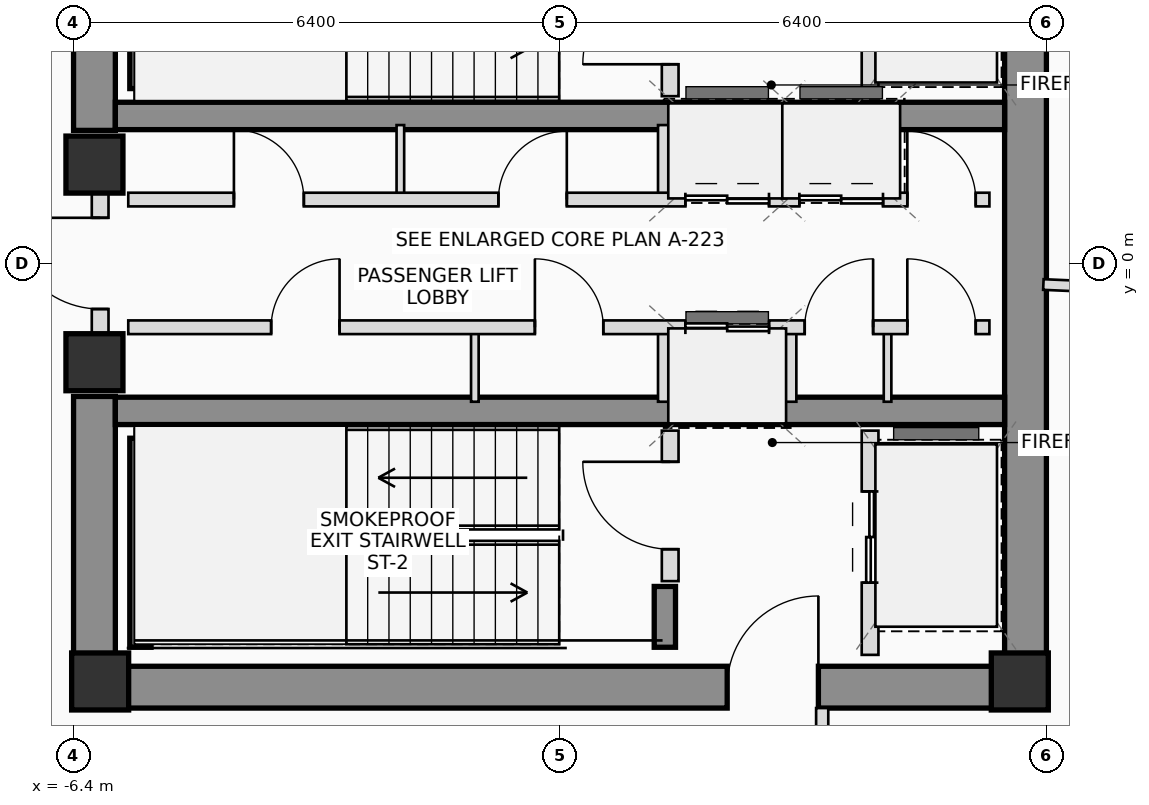
"""IFC4 building model, lengths in metres.
Left out: names, types, materials, properties, quantities, classifications, styles, units other than length and angle.
Written with IfcOpenShell. Run it as: python <this file> out.ifc"""

import sys

from ifc_helpers import new_model, si_unit, direction, frame, frame_2d, origin, origin_2d, place, context, subcontext, project, spatial, rectangle, extrude, source, transform, mapped, element, fill, save


model = new_model("IFC4")
c1 = context("Model", 3, precision=1e-05, world=origin(), true_north=direction((0.0, 1.0)))
c2 = subcontext(c1, "Body", "Model", "MODEL_VIEW")
j1 = project(units=[si_unit("LENGTHUNIT", "METRE"), si_unit("PLANEANGLEUNIT", "RADIAN")], contexts=[c1])
p1 = place(None, origin())
s1 = spatial("IfcSite", under=j1, at=p1, CompositionType="ELEMENT")
p2 = place(p1, origin())
s2 = spatial("IfcBuilding", under=s1, at=p2, CompositionType="ELEMENT")
p3 = place(p2, frame((0.0, 0.0, 245.65)))
s3 = spatial("IfcBuildingStorey", under=s2, at=p3, CompositionType="ELEMENT", Elevation=245.65)
m1 = source(origin(), c2, "Body", "SweptSolid", [
    extrude(rectangle(XDim=0.75, YDim=0.75, at=origin_2d()), origin(), (0.0, 0.0, 1.0), 3.4),
])
for number, where, z_axis, x_axis in (
    (1, (-6.05, -5.5, 0.0), (0.0, 0.0, 1.0), (1.0, 0.0, 0.0)),
    (2, (6.05, -5.5, 0.0), (0.0, 0.0, 1.0), (1.0, 0.0, 0.0)),
):
    element("IfcColumn", number, at=place(p3, frame(where, z_axis=z_axis, x_axis=x_axis)), inside=s3, PredefinedType="COLUMN", context=c2, shape_type="MappedRepresentation", body=[
        mapped(m1, transform((0.0, 0.0, 0.0), scale=1.0)),
    ])
p4 = place(p3, frame((-6.4, -5.575, 0.0), z_axis=(0.0, 0.0, 1.0), x_axis=(1.0, 0.0, 0.0)))
e3 = element("IfcWall", 3, at=p4, inside=s3, PredefinedType="SHEAR", context=c2, shape_type="SweptSolid", body=[
    extrude(rectangle(XDim=12.8, YDim=0.55, at=frame_2d((6.4, 0.0))), origin(), (0.0, 0.0, 1.0), 3.4),
])
p5 = place(p4, frame((8.6, 0.0, 0.0)))
e4 = element("IfcOpeningElement", 4, at=p5, cuts=e3, PredefinedType="OPENING", context=c2, shape_type="SweptSolid", body=[
    extrude(rectangle(XDim=1.2, YDim=2.2, at=frame_2d((0.6, 1.1))), frame((0.0, 0.285, 0.0), z_axis=(0.0, -1.0, 0.0), x_axis=(1.0, 0.0, 0.0)), (0.0, 0.0, 1.0), 0.57),
])
p6 = place(p3, frame((6.125, -5.3, 0.0), z_axis=(0.0, 0.0, 1.0), x_axis=(0.0, 1.0, 0.0)))
e5 = element("IfcWall", 5, at=p6, inside=s3, PredefinedType="SHEAR", context=c2, shape_type="SweptSolid", body=[
    extrude(rectangle(XDim=10.6, YDim=0.55, at=frame_2d((5.3, 0.0))), origin(), (0.0, 0.0, 1.0), 3.4),
])
for number, where, z_axis, x_axis in (
    (6, (-6.125, -5.3, 0.0), (0.0, 0.0, 1.0), (0.0, 1.0, 0.0)),
    (7, (-6.125, 1.75, 0.0), (0.0, 0.0, 1.0), (0.0, 1.0, 0.0)),
):
    element("IfcWall", number, at=place(p3, frame(where, z_axis=z_axis, x_axis=x_axis)), inside=s3, PredefinedType="SHEAR", context=c2, shape_type="SweptSolid", body=[
        extrude(rectangle(XDim=3.55, YDim=0.55, at=frame_2d((1.775, 0.0))), origin(), (0.0, 0.0, 1.0), 3.4),
    ])
for number, where, z_axis, x_axis in (
    (8, (-5.85, 1.94, 0.0), (0.0, 0.0, 1.0), (1.0, 0.0, 0.0)),
    (9, (-5.85, -1.94, 0.0), (0.0, 0.0, 1.0), (1.0, 0.0, 0.0)),
):
    element("IfcWall", number, at=place(p3, frame(where, z_axis=z_axis, x_axis=x_axis)), inside=s3, PredefinedType="SHEAR", context=c2, shape_type="SweptSolid", body=[
        extrude(rectangle(XDim=11.7, YDim=0.36, at=frame_2d((5.85, 0.0))), origin(), (0.0, 0.0, 1.0), 3.4),
    ])
for number, where, z_axis, x_axis in (
    (10, (-5.52, 2.3, 0.0), (0.0, 0.0, 1.0), (0.0, 1.0, 0.0)),
    (11, (-5.52, -5.05, 0.0), (0.0, 0.0, 1.0), (0.0, 1.0, 0.0)),
):
    element("IfcWall", number, at=place(p3, frame(where, z_axis=z_axis, x_axis=x_axis)), inside=s3, PredefinedType="SHEAR", context=c2, shape_type="SweptSolid", body=[
        extrude(rectangle(XDim=2.75, YDim=0.28, at=frame_2d((1.375, 0.0))), origin(), (0.0, 0.0, 1.0), 3.4),
    ])
p7 = place(p3, frame((1.38, -5.05, 0.0), z_axis=(0.0, 0.0, 1.0), x_axis=(0.0, 1.0, 0.0)))
e12 = element("IfcWall", 12, at=p7, inside=s3, PredefinedType="SHEAR", context=c2, shape_type="SweptSolid", body=[
    extrude(rectangle(XDim=0.8, YDim=0.28, at=frame_2d((0.4, 0.0))), origin(), (0.0, 0.0, 1.0), 3.4),
])
for number, where, z_axis, x_axis in (
    (13, (-6.125, -1.3, 0.0), (0.0, 0.0, 1.0), (1.0, 0.0, 0.0)),
    (14, (-6.125, 1.3, 0.0), (0.0, 0.0, 1.0), (1.0, 0.0, 0.0)),
):
    element("IfcColumn", number, at=place(p3, frame(where, z_axis=z_axis, x_axis=x_axis)), inside=s3, PredefinedType="COLUMN", context=c2, shape_type="MappedRepresentation", body=[
        mapped(m1, transform((0.0, 0.0, 0.0), scale=1.0)),
    ])
p8 = place(p3, frame((-6.05, -0.95, 0.0), z_axis=(0.0, 0.0, 1.0), x_axis=(0.0, 1.0, 0.0)))
e15 = element("IfcWall", 15, at=p8, inside=s3, PredefinedType="PLUMBINGWALL", context=c2, shape_type="SweptSolid", body=[
    extrude(rectangle(XDim=1.9, YDim=0.22, at=frame_2d((0.95, 0.0))), origin(), (0.0, 0.0, 1.0), 2.18),
])
p9 = place(p8, frame((0.35, 0.0, 0.0)))
e16 = element("IfcOpeningElement", 16, at=p9, cuts=e15, PredefinedType="OPENING", context=c2, shape_type="SweptSolid", body=[
    extrude(rectangle(XDim=1.2, YDim=2.2, at=frame_2d((0.6, 1.1))), frame((0.0, 0.12, 0.0), z_axis=(0.0, -1.0, 0.0), x_axis=(1.0, 0.0, 0.0)), (0.0, 0.0, 1.0), 0.24),
])
p10 = place(p3, frame((1.45, 2.2, 0.0), z_axis=(0.0, 0.0, 1.0), x_axis=(0.0, 1.0, 0.0)))
e17 = element("IfcWall", 17, at=p10, inside=s3, PredefinedType="PLUMBINGWALL", context=c2, shape_type="SweptSolid", body=[
    extrude(rectangle(XDim=1.98, YDim=0.22, at=frame_2d((0.99, 0.0))), origin(), (0.0, 0.0, 1.0), 3.2),
])
p11 = place(p10, frame((0.42, 0.0, 0.0)))
e18 = element("IfcOpeningElement", 18, at=p11, cuts=e17, PredefinedType="OPENING", context=c2, shape_type="SweptSolid", body=[
    extrude(rectangle(XDim=1.15, YDim=2.15, at=frame_2d((0.575, 1.075))), frame((0.0, 0.12, 0.0), z_axis=(0.0, -1.0, 0.0), x_axis=(1.0, 0.0, 0.0)), (0.0, 0.0, 1.0), 0.24),
])
p12 = place(p3, frame((4.08, 2.2, 0.0), z_axis=(0.0, 0.0, 1.0), x_axis=(0.0, 1.0, 0.0)))
e19 = element("IfcWall", 19, at=p12, inside=s3, PredefinedType="PLUMBINGWALL", context=c2, shape_type="SweptSolid", body=[
    extrude(rectangle(XDim=2.95, YDim=0.22, at=frame_2d((1.475, 0.0))), origin(), (0.0, 0.0, 1.0), 3.2),
])
p13 = place(p12, frame((0.75, 0.0, 0.0)))
e20 = element("IfcOpeningElement", 20, at=p13, cuts=e19, PredefinedType="OPENING", context=c2, shape_type="SweptSolid", body=[
    extrude(rectangle(XDim=1.2, YDim=2.25, at=frame_2d((0.6, 1.125))), frame((0.0, 0.12, 0.0), z_axis=(0.0, -1.0, 0.0), x_axis=(1.0, 0.0, 0.0)), (0.0, 0.0, 1.0), 0.24),
])
p14 = place(p3, frame((1.45, -4.18, 0.0), z_axis=(0.0, 0.0, 1.0), x_axis=(0.0, 1.0, 0.0)))
e21 = element("IfcWall", 21, at=p14, inside=s3, PredefinedType="PLUMBINGWALL", context=c2, shape_type="SweptSolid", body=[
    extrude(rectangle(XDim=1.98, YDim=0.22, at=frame_2d((0.99, 0.0))), origin(), (0.0, 0.0, 1.0), 3.2),
])
p15 = place(p14, frame((0.42, 0.0, 0.0)))
e22 = element("IfcOpeningElement", 22, at=p15, cuts=e21, PredefinedType="OPENING", context=c2, shape_type="SweptSolid", body=[
    extrude(rectangle(XDim=1.15, YDim=2.15, at=frame_2d((0.575, 1.075))), frame((0.0, 0.12, 0.0), z_axis=(0.0, -1.0, 0.0), x_axis=(1.0, 0.0, 0.0)), (0.0, 0.0, 1.0), 0.24),
])
p16 = place(p3, frame((4.08, -5.15, 0.0), z_axis=(0.0, 0.0, 1.0), x_axis=(0.0, 1.0, 0.0)))
e23 = element("IfcWall", 23, at=p16, inside=s3, PredefinedType="PLUMBINGWALL", context=c2, shape_type="SweptSolid", body=[
    extrude(rectangle(XDim=2.95, YDim=0.22, at=frame_2d((1.475, 0.0))), origin(), (0.0, 0.0, 1.0), 3.2),
])
p17 = place(p16, frame((0.95, 0.0, 0.0)))
e24 = element("IfcOpeningElement", 24, at=p17, cuts=e23, PredefinedType="OPENING", context=c2, shape_type="SweptSolid", body=[
    extrude(rectangle(XDim=1.2, YDim=2.25, at=frame_2d((0.6, 1.125))), frame((0.0, 0.12, 0.0), z_axis=(0.0, -1.0, 0.0), x_axis=(1.0, 0.0, 0.0)), (0.0, 0.0, 1.0), 0.24),
])
for number, where, z_axis, x_axis in (
    (25, (-2.1, 0.84, 0.0), (0.0, 0.0, 1.0), (0.0, 1.0, 0.0)),
    (26, (-1.12, -1.82, 0.0), (0.0, 0.0, 1.0), (0.0, 1.0, 0.0)),
):
    element("IfcWall", number, at=place(p3, frame(where, z_axis=z_axis, x_axis=x_axis)), inside=s3, PredefinedType="PARTITIONING", context=c2, shape_type="SweptSolid", body=[
        extrude(rectangle(XDim=0.98, YDim=0.1, at=frame_2d((0.49, 0.0))), origin(), (0.0, 0.0, 1.0), 3.2),
    ])
for number, where, z_axis, x_axis in (
    (27, (1.38, 0.84, 0.0), (0.0, 0.0, 1.0), (0.0, 1.0, 0.0)),
    (28, (1.38, -1.82, 0.0), (0.0, 0.0, 1.0), (0.0, 1.0, 0.0)),
    (29, (3.02, 0.84, 0.0), (0.0, 0.0, 1.0), (0.0, 1.0, 0.0)),
    (30, (4.38, 0.84, 0.0), (0.0, 0.0, 1.0), (0.0, 1.0, 0.0)),
    (31, (3.02, -1.82, 0.0), (0.0, 0.0, 1.0), (0.0, 1.0, 0.0)),
):
    element("IfcWall", number, at=place(p3, frame(where, z_axis=z_axis, x_axis=x_axis)), inside=s3, PredefinedType="PLUMBINGWALL", context=c2, shape_type="SweptSolid", body=[
        extrude(rectangle(XDim=0.98, YDim=0.18, at=frame_2d((0.49, 0.0))), origin(), (0.0, 0.0, 1.0), 3.2),
    ])
p18 = place(p3, frame((4.31, -1.82, 0.0), z_axis=(0.0, 0.0, 1.0), x_axis=(0.0, 1.0, 0.0)))
e32 = element("IfcWall", 32, at=p18, inside=s3, PredefinedType="PARTITIONING", context=c2, shape_type="SweptSolid", body=[
    extrude(rectangle(XDim=0.98, YDim=0.1, at=frame_2d((0.49, 0.0))), origin(), (0.0, 0.0, 1.0), 3.2),
])
p19 = place(p3, frame((-5.68, 0.84, 0.0), z_axis=(0.0, 0.0, 1.0), x_axis=(1.0, 0.0, 0.0)))
e33 = element("IfcWall", 33, at=p19, inside=s3, PredefinedType="PLUMBINGWALL", context=c2, shape_type="SweptSolid", body=[
    extrude(rectangle(XDim=11.33, YDim=0.18, at=frame_2d((5.665, 0.0))), origin(), (0.0, 0.0, 1.0), 3.2),
])
p20 = place(p19, frame((1.39, 0.0, 0.0)))
e34 = element("IfcOpeningElement", 34, at=p20, cuts=e33, PredefinedType="OPENING", context=c2, shape_type="SweptSolid", body=[
    extrude(rectangle(XDim=0.92, YDim=2.1, at=frame_2d((0.46, 1.05))), frame((0.0, 0.1, 0.0), z_axis=(0.0, -1.0, 0.0), x_axis=(1.0, 0.0, 0.0)), (0.0, 0.0, 1.0), 0.2),
])
p21 = place(p19, frame((4.87, 0.0, 0.0)))
e35 = element("IfcOpeningElement", 35, at=p21, cuts=e33, PredefinedType="OPENING", context=c2, shape_type="SweptSolid", body=[
    extrude(rectangle(XDim=0.9, YDim=2.05, at=frame_2d((0.45, 1.025))), frame((0.0, 0.1, 0.0), z_axis=(0.0, -1.0, 0.0), x_axis=(1.0, 0.0, 0.0)), (0.0, 0.0, 1.0), 0.2),
])
p22 = place(p19, frame((7.33, 0.0, 0.0)))
e36 = element("IfcOpeningElement", 36, at=p22, cuts=e33, PredefinedType="OPENING", context=c2, shape_type="SweptSolid", body=[
    extrude(rectangle(XDim=1.1, YDim=2.2, at=frame_2d((0.55, 1.1))), frame((0.0, 0.1, 0.0), z_axis=(0.0, -1.0, 0.0), x_axis=(1.0, 0.0, 0.0)), (0.0, 0.0, 1.0), 0.2),
])
p23 = place(p19, frame((8.83, 0.0, 0.0)))
e37 = element("IfcOpeningElement", 37, at=p23, cuts=e33, PredefinedType="OPENING", context=c2, shape_type="SweptSolid", body=[
    extrude(rectangle(XDim=1.1, YDim=2.2, at=frame_2d((0.55, 1.1))), frame((0.0, 0.1, 0.0), z_axis=(0.0, -1.0, 0.0), x_axis=(1.0, 0.0, 0.0)), (0.0, 0.0, 1.0), 0.2),
])
p24 = place(p19, frame((10.25, 0.0, 0.0)))
e38 = element("IfcOpeningElement", 38, at=p24, cuts=e33, PredefinedType="OPENING", context=c2, shape_type="SweptSolid", body=[
    extrude(rectangle(XDim=0.9, YDim=2.05, at=frame_2d((0.45, 1.025))), frame((0.0, 0.1, 0.0), z_axis=(0.0, -1.0, 0.0), x_axis=(1.0, 0.0, 0.0)), (0.0, 0.0, 1.0), 0.2),
])
p25 = place(p3, frame((-5.68, -0.84, 0.0), z_axis=(0.0, 0.0, 1.0), x_axis=(1.0, 0.0, 0.0)))
e39 = element("IfcWall", 39, at=p25, inside=s3, PredefinedType="PLUMBINGWALL", context=c2, shape_type="SweptSolid", body=[
    extrude(rectangle(XDim=11.33, YDim=0.18, at=frame_2d((5.665, 0.0))), origin(), (0.0, 0.0, 1.0), 3.2),
])
p26 = place(p25, frame((1.88, 0.0, 0.0)))
e40 = element("IfcOpeningElement", 40, at=p26, cuts=e39, PredefinedType="OPENING", context=c2, shape_type="SweptSolid", body=[
    extrude(rectangle(XDim=0.9, YDim=2.05, at=frame_2d((0.45, 1.025))), frame((0.0, 0.1, 0.0), z_axis=(0.0, -1.0, 0.0), x_axis=(1.0, 0.0, 0.0)), (0.0, 0.0, 1.0), 0.2),
])
p27 = place(p25, frame((5.35, 0.0, 0.0)))
e41 = element("IfcOpeningElement", 41, at=p27, cuts=e39, PredefinedType="OPENING", context=c2, shape_type="SweptSolid", body=[
    extrude(rectangle(XDim=0.9, YDim=2.05, at=frame_2d((0.45, 1.025))), frame((0.0, 0.1, 0.0), z_axis=(0.0, -1.0, 0.0), x_axis=(1.0, 0.0, 0.0)), (0.0, 0.0, 1.0), 0.2),
])
p28 = place(p25, frame((7.33, 0.0, 0.0)))
e42 = element("IfcOpeningElement", 42, at=p28, cuts=e39, PredefinedType="OPENING", context=c2, shape_type="SweptSolid", body=[
    extrude(rectangle(XDim=1.1, YDim=2.2, at=frame_2d((0.55, 1.1))), frame((0.0, 0.1, 0.0), z_axis=(0.0, -1.0, 0.0), x_axis=(1.0, 0.0, 0.0)), (0.0, 0.0, 1.0), 0.2),
])
p29 = place(p25, frame((8.9, 0.0, 0.0)))
e43 = element("IfcOpeningElement", 43, at=p29, cuts=e39, PredefinedType="OPENING", context=c2, shape_type="SweptSolid", body=[
    extrude(rectangle(XDim=0.9, YDim=2.05, at=frame_2d((0.45, 1.025))), frame((0.0, 0.1, 0.0), z_axis=(0.0, -1.0, 0.0), x_axis=(1.0, 0.0, 0.0)), (0.0, 0.0, 1.0), 0.2),
])
p30 = place(p25, frame((10.25, 0.0, 0.0)))
e44 = element("IfcOpeningElement", 44, at=p30, cuts=e39, PredefinedType="OPENING", context=c2, shape_type="SweptSolid", body=[
    extrude(rectangle(XDim=0.9, YDim=2.05, at=frame_2d((0.45, 1.025))), frame((0.0, 0.1, 0.0), z_axis=(0.0, -1.0, 0.0), x_axis=(1.0, 0.0, 0.0)), (0.0, 0.0, 1.0), 0.2),
])
p31 = place(p3, frame((3.45, -5.85, 0.0), z_axis=(0.0, 0.0, 1.0), x_axis=(0.0, -1.0, 0.0)))
e45 = element("IfcWall", 45, at=p31, inside=s3, PredefinedType="PARTITIONING", context=c2, shape_type="SweptSolid", body=[
    extrude(rectangle(XDim=1.64, YDim=0.16, at=frame_2d((0.82, 0.0))), origin(), (0.0, 0.0, 1.0), 3.2),
])
p32 = place(p31, frame((0.32, 0.0, 0.0)))
e46 = element("IfcOpeningElement", 46, at=p32, cuts=e45, PredefinedType="OPENING", context=c2, shape_type="SweptSolid", body=[
    extrude(rectangle(XDim=1.0, YDim=2.25, at=frame_2d((0.5, 1.125))), frame((0.0, 0.09, 0.0), z_axis=(0.0, -1.0, 0.0), x_axis=(1.0, 0.0, 0.0)), (0.0, 0.0, 1.0), 0.18),
])
p33 = place(p3, frame((6.36, -0.278, 0.0), z_axis=(0.0, 0.0, 1.0), x_axis=(0.99904773846, -0.043630451279, 0.0)))
e47 = element("IfcWall", 47, at=p33, inside=s3, PredefinedType="PARTITIONING", context=c2, shape_type="SweptSolid", body=[
    extrude(rectangle(XDim=8.992, YDim=0.14, at=frame_2d((4.496, 0.0))), origin(), (0.0, 0.0, 1.0), 2.605),
])
p34 = place(p5, origin())
e48 = element("IfcDoor", 48, at=p34, inside=s3, OperationType="SINGLE_SWING_RIGHT", PredefinedType="DOOR", context=c2, shape_type="SweptSolid", body=[
    extrude(rectangle(XDim=1.2, YDim=2.2, at=frame_2d((0.6, 1.1))), frame((0.0, 0.025, 0.0), z_axis=(0.0, -1.0, 0.0), x_axis=(1.0, 0.0, 0.0)), (0.0, 0.0, 1.0), 0.05),
])
fill(e4, e48)
p35 = place(p9, origin())
e49 = element("IfcDoor", 49, at=p35, inside=s3, OperationType="SINGLE_SWING_RIGHT", PredefinedType="DOOR", context=c2, shape_type="SweptSolid", body=[
    extrude(rectangle(XDim=1.2, YDim=2.2, at=frame_2d((0.6, 1.1))), frame((0.0, 0.025, 0.0), z_axis=(0.0, -1.0, 0.0), x_axis=(1.0, 0.0, 0.0)), (0.0, 0.0, 1.0), 0.05),
])
fill(e16, e49)
p36 = place(p11, origin())
e50 = element("IfcDoor", 50, at=p36, inside=s3, OperationType="SINGLE_SWING_LEFT", PredefinedType="DOOR", context=c2, shape_type="SweptSolid", body=[
    extrude(rectangle(XDim=1.15, YDim=2.15, at=frame_2d((0.575, 1.075))), frame((0.0, 0.025, 0.0), z_axis=(0.0, -1.0, 0.0), x_axis=(1.0, 0.0, 0.0)), (0.0, 0.0, 1.0), 0.05),
])
fill(e18, e50)
p37 = place(p15, origin())
e51 = element("IfcDoor", 51, at=p37, inside=s3, OperationType="SINGLE_SWING_RIGHT", PredefinedType="DOOR", context=c2, shape_type="SweptSolid", body=[
    extrude(rectangle(XDim=1.15, YDim=2.15, at=frame_2d((0.575, 1.075))), frame((0.0, 0.025, 0.0), z_axis=(0.0, -1.0, 0.0), x_axis=(1.0, 0.0, 0.0)), (0.0, 0.0, 1.0), 0.05),
])
fill(e22, e51)
p38 = place(p17, origin())
e52 = element("IfcDoor", 52, at=p38, inside=s3, OperationType="DOUBLE_DOOR_SLIDING", PredefinedType="DOOR", context=c2, shape_type="SweptSolid", body=[
    extrude(rectangle(XDim=1.2, YDim=2.25, at=frame_2d((0.6, 1.125))), frame((0.0, 0.025, 0.0), z_axis=(0.0, -1.0, 0.0), x_axis=(1.0, 0.0, 0.0)), (0.0, 0.0, 1.0), 0.05),
])
fill(e24, e52)
p39 = place(p20, origin())
e53 = element("IfcDoor", 53, at=p39, inside=s3, OperationType="SINGLE_SWING_LEFT", PredefinedType="DOOR", context=c2, shape_type="SweptSolid", body=[
    extrude(rectangle(XDim=0.92, YDim=2.1, at=frame_2d((0.46, 1.05))), frame((0.0, 0.025, 0.0), z_axis=(0.0, -1.0, 0.0), x_axis=(1.0, 0.0, 0.0)), (0.0, 0.0, 1.0), 0.05),
])
fill(e34, e53)
p40 = place(p21, origin())
e54 = element("IfcDoor", 54, at=p40, inside=s3, OperationType="SINGLE_SWING_RIGHT", PredefinedType="DOOR", context=c2, shape_type="SweptSolid", body=[
    extrude(rectangle(XDim=0.9, YDim=2.05, at=frame_2d((0.45, 1.025))), frame((0.0, 0.025, 0.0), z_axis=(0.0, -1.0, 0.0), x_axis=(1.0, 0.0, 0.0)), (0.0, 0.0, 1.0), 0.05),
])
fill(e35, e54)
p41 = place(p22, origin())
e55 = element("IfcDoor", 55, at=p41, inside=s3, OperationType="DOUBLE_DOOR_SLIDING", PredefinedType="DOOR", context=c2, shape_type="SweptSolid", body=[
    extrude(rectangle(XDim=1.1, YDim=2.2, at=frame_2d((0.55, 1.1))), frame((0.0, 0.025, 0.0), z_axis=(0.0, -1.0, 0.0), x_axis=(1.0, 0.0, 0.0)), (0.0, 0.0, 1.0), 0.05),
])
fill(e36, e55)
p42 = place(p23, origin())
e56 = element("IfcDoor", 56, at=p42, inside=s3, OperationType="DOUBLE_DOOR_SLIDING", PredefinedType="DOOR", context=c2, shape_type="SweptSolid", body=[
    extrude(rectangle(XDim=1.1, YDim=2.2, at=frame_2d((0.55, 1.1))), frame((0.0, 0.025, 0.0), z_axis=(0.0, -1.0, 0.0), x_axis=(1.0, 0.0, 0.0)), (0.0, 0.0, 1.0), 0.05),
])
fill(e37, e56)
p43 = place(p24, origin())
e57 = element("IfcDoor", 57, at=p43, inside=s3, OperationType="SINGLE_SWING_LEFT", PredefinedType="DOOR", context=c2, shape_type="SweptSolid", body=[
    extrude(rectangle(XDim=0.9, YDim=2.05, at=frame_2d((0.45, 1.025))), frame((0.0, 0.025, 0.0), z_axis=(0.0, -1.0, 0.0), x_axis=(1.0, 0.0, 0.0)), (0.0, 0.0, 1.0), 0.05),
])
fill(e38, e57)
p44 = place(p26, origin())
e58 = element("IfcDoor", 58, at=p44, inside=s3, OperationType="SINGLE_SWING_RIGHT", PredefinedType="DOOR", context=c2, shape_type="SweptSolid", body=[
    extrude(rectangle(XDim=0.9, YDim=2.05, at=frame_2d((0.45, 1.025))), frame((0.0, 0.025, 0.0), z_axis=(0.0, -1.0, 0.0), x_axis=(1.0, 0.0, 0.0)), (0.0, 0.0, 1.0), 0.05),
])
fill(e40, e58)
p45 = place(p27, origin())
e59 = element("IfcDoor", 59, at=p45, inside=s3, OperationType="SINGLE_SWING_LEFT", PredefinedType="DOOR", context=c2, shape_type="SweptSolid", body=[
    extrude(rectangle(XDim=0.9, YDim=2.05, at=frame_2d((0.45, 1.025))), frame((0.0, 0.025, 0.0), z_axis=(0.0, -1.0, 0.0), x_axis=(1.0, 0.0, 0.0)), (0.0, 0.0, 1.0), 0.05),
])
fill(e41, e59)
p46 = place(p28, origin())
e60 = element("IfcDoor", 60, at=p46, inside=s3, OperationType="DOUBLE_DOOR_SLIDING", PredefinedType="DOOR", context=c2, shape_type="SweptSolid", body=[
    extrude(rectangle(XDim=1.1, YDim=2.2, at=frame_2d((0.55, 1.1))), frame((0.0, 0.025, 0.0), z_axis=(0.0, -1.0, 0.0), x_axis=(1.0, 0.0, 0.0)), (0.0, 0.0, 1.0), 0.05),
])
fill(e42, e60)
p47 = place(p29, origin())
e61 = element("IfcDoor", 61, at=p47, inside=s3, OperationType="SINGLE_SWING_RIGHT", PredefinedType="DOOR", context=c2, shape_type="SweptSolid", body=[
    extrude(rectangle(XDim=0.9, YDim=2.05, at=frame_2d((0.45, 1.025))), frame((0.0, 0.025, 0.0), z_axis=(0.0, -1.0, 0.0), x_axis=(1.0, 0.0, 0.0)), (0.0, 0.0, 1.0), 0.05),
])
fill(e43, e61)
p48 = place(p30, origin())
e62 = element("IfcDoor", 62, at=p48, inside=s3, OperationType="SINGLE_SWING_LEFT", PredefinedType="DOOR", context=c2, shape_type="SweptSolid", body=[
    extrude(rectangle(XDim=0.9, YDim=2.05, at=frame_2d((0.45, 1.025))), frame((0.0, 0.025, 0.0), z_axis=(0.0, -1.0, 0.0), x_axis=(1.0, 0.0, 0.0)), (0.0, 0.0, 1.0), 0.05),
])
fill(e44, e62)
save(model, sys.argv[1])
